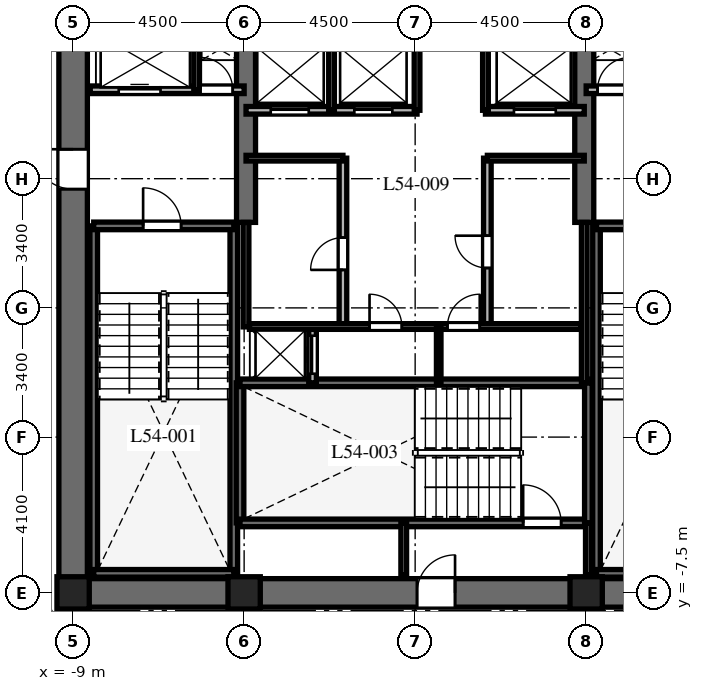
"""IFC4 building model, lengths in metres.
Left out: names, types, materials, properties, quantities, classifications, styles, units other than length and angle.
Written with IfcOpenShell. Run it as: python <this file> out.ifc"""

import sys

from ifc_helpers import new_model, si_unit, direction, frame, frame_2d, origin, origin_2d, place, context, subcontext, project, spatial, rectangle, extrude, element, fill, save


model = new_model("IFC4")
c1 = context("Model", 3, precision=1e-05, world=origin(), true_north=direction((0.0, 1.0)))
c2 = subcontext(c1, "Body", "Model", "MODEL_VIEW")
j1 = project(units=[si_unit("LENGTHUNIT", "METRE"), si_unit("PLANEANGLEUNIT", "RADIAN")], contexts=[c1])
p1 = place(None, origin())
s1 = spatial("IfcSite", under=j1, at=p1, CompositionType="ELEMENT")
p2 = place(p1, origin())
s2 = spatial("IfcBuilding", under=s1, at=p2, CompositionType="ELEMENT")
p3 = place(p2, frame((0.0, 0.0, 217.9)))
s3 = spatial("IfcBuildingStorey", under=s2, at=p3, CompositionType="ELEMENT", Elevation=217.9)
p4 = place(p3, frame((-9.375, -7.5, 0.0), z_axis=(0.0, 0.0, 1.0), x_axis=(1.0, 0.0, 0.0)))
e1 = element("IfcWall", 1, at=p4, inside=s3, PredefinedType="SHEAR", context=c2, shape_type="SweptSolid", body=[
    extrude(rectangle(XDim=18.75, YDim=0.75, at=frame_2d((9.375, 0.0))), origin(), (0.0, 0.0, 1.0), 3.8),
])
p5 = place(p4, frame((9.425, 0.0, 0.0)))
e2 = element("IfcOpeningElement", 2, at=p5, cuts=e1, PredefinedType="OPENING", context=c2, shape_type="SweptSolid", body=[
    extrude(rectangle(XDim=1.0, YDim=2.15, at=frame_2d((0.5, 1.075))), frame((0.0, 0.385, 0.0), z_axis=(0.0, -1.0, 0.0), x_axis=(1.0, 0.0, 0.0)), (0.0, 0.0, 1.0), 0.77),
])
p6 = place(p3, frame((-9.0, -7.125, 0.0), z_axis=(0.0, 0.0, 1.0), x_axis=(0.0, 1.0, 0.0)))
e3 = element("IfcWall", 3, at=p6, inside=s3, PredefinedType="SHEAR", context=c2, shape_type="SweptSolid", body=[
    extrude(rectangle(XDim=14.25, YDim=0.75, at=frame_2d((7.125, 0.0))), origin(), (0.0, 0.0, 1.0), 3.8),
])
p7 = place(p6, frame((10.25, 0.0, 0.0)))
e4 = element("IfcOpeningElement", 4, at=p7, cuts=e3, PredefinedType="OPENING", context=c2, shape_type="SweptSolid", body=[
    extrude(rectangle(XDim=1.05, YDim=2.15, at=frame_2d((0.525, 1.075))), frame((0.0, 0.385, 0.0), z_axis=(0.0, -1.0, 0.0), x_axis=(1.0, 0.0, 0.0)), (0.0, 0.0, 1.0), 0.77),
])
for number, where, z_axis, x_axis in (
    (5, (-4.45, 2.25, 0.0), (0.0, 0.0, 1.0), (0.0, 1.0, 0.0)),
    (6, (4.45, 2.25, 0.0), (0.0, 0.0, 1.0), (0.0, 1.0, 0.0)),
):
    element("IfcWall", number, at=place(p3, frame(where, z_axis=z_axis, x_axis=x_axis)), inside=s3, PredefinedType="SHEAR", context=c2, shape_type="SweptSolid", body=[
        extrude(rectangle(XDim=4.875, YDim=0.5, at=frame_2d((2.438, 0.0))), origin(), (0.0, 0.0, 1.0), 3.8),
    ])
for number, where, z_axis, x_axis in (
    (7, (-8.458, -6.985, 0.0), (0.0, 0.0, 1.0), (0.0, 1.0, 0.0)),
    (8, (-4.772, -6.985, 0.0), (0.0, 0.0, 1.0), (0.0, 1.0, 0.0)),
):
    element("IfcWall", number, at=place(p3, frame(where, z_axis=z_axis, x_axis=x_axis)), inside=s3, PredefinedType="SHEAR", context=c2, shape_type="SweptSolid", body=[
        extrude(rectangle(XDim=9.143, YDim=0.2, at=frame_2d((4.572, 0.0))), origin(), (0.0, 0.0, 1.0), 3.8),
    ])
p8 = place(p3, frame((-8.458, -6.985, 0.0), z_axis=(0.0, 0.0, 1.0), x_axis=(1.0, 0.0, 0.0)))
e9 = element("IfcWall", 9, at=p8, inside=s3, PredefinedType="SHEAR", context=c2, shape_type="SweptSolid", body=[
    extrude(rectangle(XDim=3.686, YDim=0.2, at=frame_2d((1.843, 0.0))), origin(), (0.0, 0.0, 1.0), 3.8),
])
p9 = place(p3, frame((-8.458, 2.158, 0.0), z_axis=(0.0, 0.0, 1.0), x_axis=(1.0, 0.0, 0.0)))
e10 = element("IfcWall", 10, at=p9, inside=s3, PredefinedType="SHEAR", context=c2, shape_type="SweptSolid", body=[
    extrude(rectangle(XDim=3.686, YDim=0.2, at=frame_2d((1.843, 0.0))), origin(), (0.0, 0.0, 1.0), 3.8),
])
p10 = place(p9, frame((1.3, 0.0, 0.0)))
e11 = element("IfcOpeningElement", 11, at=p10, cuts=e10, PredefinedType="OPENING", context=c2, shape_type="SweptSolid", body=[
    extrude(rectangle(XDim=1.0, YDim=2.15, at=frame_2d((0.5, 1.075))), frame((0.0, 0.11, 0.0), z_axis=(0.0, -1.0, 0.0), x_axis=(1.0, 0.0, 0.0)), (0.0, 0.0, 1.0), 0.22),
])
p11 = place(p3, frame((4.772, -6.985, 0.0), z_axis=(0.0, 0.0, 1.0), x_axis=(0.0, 1.0, 0.0)))
e12 = element("IfcWall", 12, at=p11, inside=s3, PredefinedType="SHEAR", context=c2, shape_type="SweptSolid", body=[
    extrude(rectangle(XDim=9.143, YDim=0.2, at=frame_2d((4.572, 0.0))), origin(), (0.0, 0.0, 1.0), 3.8),
])
p12 = place(p3, frame((4.772, -6.985, 0.0), z_axis=(0.0, 0.0, 1.0), x_axis=(1.0, 0.0, 0.0)))
e13 = element("IfcWall", 13, at=p12, inside=s3, PredefinedType="SHEAR", context=c2, shape_type="SweptSolid", body=[
    extrude(rectangle(XDim=3.686, YDim=0.2, at=frame_2d((1.843, 0.0))), origin(), (0.0, 0.0, 1.0), 3.8),
])
p13 = place(p3, frame((4.772, 2.158, 0.0), z_axis=(0.0, 0.0, 1.0), x_axis=(1.0, 0.0, 0.0)))
e14 = element("IfcWall", 14, at=p13, inside=s3, PredefinedType="SHEAR", context=c2, shape_type="SweptSolid", body=[
    extrude(rectangle(XDim=3.686, YDim=0.2, at=frame_2d((1.843, 0.0))), origin(), (0.0, 0.0, 1.0), 3.8),
])
p14 = place(p13, frame((1.35, 0.0, 0.0)))
e15 = element("IfcOpeningElement", 15, at=p14, cuts=e14, PredefinedType="OPENING", context=c2, shape_type="SweptSolid", body=[
    extrude(rectangle(XDim=1.0, YDim=2.15, at=frame_2d((0.5, 1.075))), frame((0.0, 0.11, 0.0), z_axis=(0.0, -1.0, 0.0), x_axis=(1.0, 0.0, 0.0)), (0.0, 0.0, 1.0), 0.22),
])
p15 = place(p3, frame((-4.608, -5.658, 0.0), z_axis=(0.0, 0.0, 1.0), x_axis=(0.0, 1.0, 0.0)))
e16 = element("IfcWall", 16, at=p15, inside=s3, PredefinedType="SHEAR", context=c2, shape_type="SweptSolid", body=[
    extrude(rectangle(XDim=3.686, YDim=0.2, at=frame_2d((1.843, 0.0))), origin(), (0.0, 0.0, 1.0), 3.8),
])
p16 = place(p3, frame((-4.608, -5.658, 0.0), z_axis=(0.0, 0.0, 1.0), x_axis=(1.0, 0.0, 0.0)))
e17 = element("IfcWall", 17, at=p16, inside=s3, PredefinedType="SHEAR", context=c2, shape_type="SweptSolid", body=[
    extrude(rectangle(XDim=9.166, YDim=0.2, at=frame_2d((4.583, 0.0))), origin(), (0.0, 0.0, 1.0), 3.8),
])
p17 = place(p16, frame((7.45, 0.0, 0.0)))
e18 = element("IfcOpeningElement", 18, at=p17, cuts=e17, PredefinedType="OPENING", context=c2, shape_type="SweptSolid", body=[
    extrude(rectangle(XDim=1.0, YDim=2.15, at=frame_2d((0.5, 1.075))), frame((0.0, 0.11, 0.0), z_axis=(0.0, -1.0, 0.0), x_axis=(1.0, 0.0, 0.0)), (0.0, 0.0, 1.0), 0.22),
])
p18 = place(p3, frame((-4.608, -1.972, 0.0), z_axis=(0.0, 0.0, 1.0), x_axis=(1.0, 0.0, 0.0)))
e19 = element("IfcWall", 19, at=p18, inside=s3, PredefinedType="SHEAR", context=c2, shape_type="SweptSolid", body=[
    extrude(rectangle(XDim=9.166, YDim=0.2, at=frame_2d((4.583, 0.0))), origin(), (0.0, 0.0, 1.0), 3.8),
])
p19 = place(p3, frame((4.558, -5.658, 0.0), z_axis=(0.0, 0.0, 1.0), x_axis=(0.0, 1.0, 0.0)))
e20 = element("IfcWall", 20, at=p19, inside=s3, PredefinedType="SHEAR", context=c2, shape_type="SweptSolid", body=[
    extrude(rectangle(XDim=3.686, YDim=0.2, at=frame_2d((1.843, 0.0))), origin(), (0.0, 0.0, 1.0), 3.8),
])
for number, where, z_axis, x_axis in (
    (21, (-9.0, -7.5, 0.0), (0.0, 0.0, 1.0), (1.0, 0.0, 0.0)),
    (22, (-4.5, -7.5, 0.0), (0.0, 0.0, 1.0), (1.0, 0.0, 0.0)),
    (23, (4.5, -7.5, 0.0), (0.0, 0.0, 1.0), (1.0, 0.0, 0.0)),
):
    element("IfcColumn", number, at=place(p3, frame(where, z_axis=z_axis, x_axis=x_axis)), inside=s3, PredefinedType="COLUMN", context=c2, shape_type="SweptSolid", body=[
        extrude(rectangle(XDim=0.85, YDim=0.85, at=origin_2d()), origin(), (0.0, 0.0, 1.0), 3.8),
    ])
for number, where, z_axis, x_axis in (
    (24, (-0.3, -7.02, 0.0), (0.0, 0.0, 1.0), (0.0, 1.0, 0.0)),
    (25, (4.558, -7.02, 0.0), (0.0, 0.0, 1.0), (0.0, 1.0, 0.0)),
):
    element("IfcWall", number, at=place(p3, frame(where, z_axis=z_axis, x_axis=x_axis)), inside=s3, PredefinedType="PARTITIONING", context=c2, shape_type="SweptSolid", body=[
        extrude(rectangle(XDim=1.362, YDim=0.15, at=frame_2d((0.681, 0.0))), origin(), (0.0, 0.0, 1.0), 3.5),
    ])
p20 = place(p3, frame((-8.55, 5.74, 0.0), z_axis=(0.0, 0.0, 1.0), x_axis=(1.0, 0.0, 0.0)))
e26 = element("IfcWall", 26, at=p20, inside=s3, PredefinedType="PARTITIONING", context=c2, shape_type="SweptSolid", body=[
    extrude(rectangle(XDim=4.05, YDim=0.2, at=frame_2d((2.025, 0.0))), origin(), (0.0, 0.0, 1.0), 3.5),
])
p21 = place(p20, frame((0.75, 0.0, 0.0)))
e27 = element("IfcOpeningElement", 27, at=p21, cuts=e26, PredefinedType="OPENING", context=c2, shape_type="SweptSolid", body=[
    extrude(rectangle(XDim=1.1, YDim=2.2, at=frame_2d((0.55, 1.1))), frame((0.0, 0.11, 0.0), z_axis=(0.0, -1.0, 0.0), x_axis=(1.0, 0.0, 0.0)), (0.0, 0.0, 1.0), 0.22),
])
p22 = place(p20, frame((2.9, 0.0, 0.0)))
e28 = element("IfcOpeningElement", 28, at=p22, cuts=e26, PredefinedType="OPENING", context=c2, shape_type="SweptSolid", body=[
    extrude(rectangle(XDim=0.85, YDim=2.03, at=frame_2d((0.425, 1.015))), frame((0.0, 0.11, 0.0), z_axis=(0.0, -1.0, 0.0), x_axis=(1.0, 0.0, 0.0)), (0.0, 0.0, 1.0), 0.22),
])
p23 = place(p3, frame((-5.75, 5.74, 0.0), z_axis=(0.0, 0.0, 1.0), x_axis=(0.0, 1.0, 0.0)))
e29 = element("IfcWall", 29, at=p23, inside=s3, PredefinedType="PARTITIONING", context=c2, shape_type="SweptSolid", body=[
    extrude(rectangle(XDim=1.41, YDim=0.15, at=frame_2d((0.705, 0.0))), origin(), (0.0, 0.0, 1.0), 3.5),
])
p24 = place(p3, frame((4.5, 5.74, 0.0), z_axis=(0.0, 0.0, 1.0), x_axis=(1.0, 0.0, 0.0)))
e30 = element("IfcWall", 30, at=p24, inside=s3, PredefinedType="PARTITIONING", context=c2, shape_type="SweptSolid", body=[
    extrude(rectangle(XDim=4.05, YDim=0.2, at=frame_2d((2.025, 0.0))), origin(), (0.0, 0.0, 1.0), 3.5),
])
p25 = place(p24, frame((0.3, 0.0, 0.0)))
e31 = element("IfcOpeningElement", 31, at=p25, cuts=e30, PredefinedType="OPENING", context=c2, shape_type="SweptSolid", body=[
    extrude(rectangle(XDim=0.85, YDim=2.03, at=frame_2d((0.425, 1.015))), frame((0.0, 0.11, 0.0), z_axis=(0.0, -1.0, 0.0), x_axis=(1.0, 0.0, 0.0)), (0.0, 0.0, 1.0), 0.22),
])
p26 = place(p24, frame((2.15, 0.0, 0.0)))
e32 = element("IfcOpeningElement", 32, at=p26, cuts=e30, PredefinedType="OPENING", context=c2, shape_type="SweptSolid", body=[
    extrude(rectangle(XDim=1.1, YDim=2.2, at=frame_2d((0.55, 1.1))), frame((0.0, 0.11, 0.0), z_axis=(0.0, -1.0, 0.0), x_axis=(1.0, 0.0, 0.0)), (0.0, 0.0, 1.0), 0.22),
])
p27 = place(p3, frame((-2.7, -1.972, 0.0), z_axis=(0.0, 0.0, 1.0), x_axis=(0.0, 1.0, 0.0)))
e33 = element("IfcWall", 33, at=p27, inside=s3, PredefinedType="PARTITIONING", context=c2, shape_type="SweptSolid", body=[
    extrude(rectangle(XDim=1.472, YDim=0.2, at=frame_2d((0.736, 0.0))), origin(), (0.0, 0.0, 1.0), 3.5),
])
p28 = place(p27, frame((0.24, 0.0, 0.0)))
e34 = element("IfcOpeningElement", 34, at=p28, cuts=e33, PredefinedType="OPENING", context=c2, shape_type="SweptSolid", body=[
    extrude(rectangle(XDim=1.0, YDim=2.2, at=frame_2d((0.5, 1.1))), frame((0.0, 0.11, 0.0), z_axis=(0.0, -1.0, 0.0), x_axis=(1.0, 0.0, 0.0)), (0.0, 0.0, 1.0), 0.22),
])
p29 = place(p3, frame((-4.45, 5.2, 0.0), z_axis=(0.0, 0.0, 1.0), x_axis=(1.0, 0.0, 0.0)))
e35 = element("IfcWall", 35, at=p29, inside=s3, PredefinedType="PARTITIONING", context=c2, shape_type="SweptSolid", body=[
    extrude(rectangle(XDim=4.5, YDim=0.2, at=frame_2d((2.25, 0.0))), origin(), (0.0, 0.0, 1.0), 3.5),
])
p30 = place(p29, frame((0.65, 0.0, 0.0)))
e36 = element("IfcOpeningElement", 36, at=p30, cuts=e35, PredefinedType="OPENING", context=c2, shape_type="SweptSolid", body=[
    extrude(rectangle(XDim=1.0, YDim=2.2, at=frame_2d((0.5, 1.1))), frame((0.0, 0.11, 0.0), z_axis=(0.0, -1.0, 0.0), x_axis=(1.0, 0.0, 0.0)), (0.0, 0.0, 1.0), 0.22),
])
p31 = place(p29, frame((2.85, 0.0, 0.0)))
e37 = element("IfcOpeningElement", 37, at=p31, cuts=e35, PredefinedType="OPENING", context=c2, shape_type="SweptSolid", body=[
    extrude(rectangle(XDim=1.0, YDim=2.2, at=frame_2d((0.5, 1.1))), frame((0.0, 0.11, 0.0), z_axis=(0.0, -1.0, 0.0), x_axis=(1.0, 0.0, 0.0)), (0.0, 0.0, 1.0), 0.22),
])
p32 = place(p3, frame((1.85, 5.2, 0.0), z_axis=(0.0, 0.0, 1.0), x_axis=(1.0, 0.0, 0.0)))
e38 = element("IfcWall", 38, at=p32, inside=s3, PredefinedType="PARTITIONING", context=c2, shape_type="SweptSolid", body=[
    extrude(rectangle(XDim=2.6, YDim=0.2, at=frame_2d((1.3, 0.0))), origin(), (0.0, 0.0, 1.0), 3.5),
])
p33 = place(p32, frame((0.75, 0.0, 0.0)))
e39 = element("IfcOpeningElement", 39, at=p33, cuts=e38, PredefinedType="OPENING", context=c2, shape_type="SweptSolid", body=[
    extrude(rectangle(XDim=1.1, YDim=2.2, at=frame_2d((0.55, 1.1))), frame((0.0, 0.11, 0.0), z_axis=(0.0, -1.0, 0.0), x_axis=(1.0, 0.0, 0.0)), (0.0, 0.0, 1.0), 0.22),
])
p34 = place(p3, frame((-2.2, 5.2, 0.0), z_axis=(0.0, 0.0, 1.0), x_axis=(0.0, 1.0, 0.0)))
e40 = element("IfcWall", 40, at=p34, inside=s3, PredefinedType="PARTITIONING", context=c2, shape_type="SweptSolid", body=[
    extrude(rectangle(XDim=1.85, YDim=0.15, at=frame_2d((0.925, 0.0))), origin(), (0.0, 0.0, 1.0), 3.5),
])
for number, where, z_axis, x_axis in (
    (41, (0.05, 5.2, 0.0), (0.0, 0.0, 1.0), (0.0, 1.0, 0.0)),
    (42, (1.85, 5.2, 0.0), (0.0, 0.0, 1.0), (0.0, 1.0, 0.0)),
):
    element("IfcWall", number, at=place(p3, frame(where, z_axis=z_axis, x_axis=x_axis)), inside=s3, PredefinedType="PARTITIONING", context=c2, shape_type="SweptSolid", body=[
        extrude(rectangle(XDim=1.95, YDim=0.15, at=frame_2d((0.975, 0.0))), origin(), (0.0, 0.0, 1.0), 3.5),
    ])
p35 = place(p3, frame((-4.45, -0.5, 0.0), z_axis=(0.0, 0.0, 1.0), x_axis=(0.0, 1.0, 0.0)))
e43 = element("IfcWall", 43, at=p35, inside=s3, PredefinedType="PARTITIONING", context=c2, shape_type="SweptSolid", body=[
    extrude(rectangle(XDim=2.75, YDim=0.15, at=frame_2d((1.375, 0.0))), origin(), (0.0, 0.0, 1.0), 3.5),
])
p36 = place(p3, frame((4.45, -1.972, 0.0), z_axis=(0.0, 0.0, 1.0), x_axis=(0.0, 1.0, 0.0)))
e44 = element("IfcWall", 44, at=p36, inside=s3, PredefinedType="PARTITIONING", context=c2, shape_type="SweptSolid", body=[
    extrude(rectangle(XDim=4.222, YDim=0.15, at=frame_2d((2.111, 0.0))), origin(), (0.0, 0.0, 1.0), 3.5),
])
p37 = place(p3, frame((-1.9, -0.5, 0.0), z_axis=(0.0, 0.0, 1.0), x_axis=(0.0, 1.0, 0.0)))
e45 = element("IfcWall", 45, at=p37, inside=s3, PredefinedType="PARTITIONING", context=c2, shape_type="SweptSolid", body=[
    extrude(rectangle(XDim=4.44, YDim=0.2, at=frame_2d((2.22, 0.0))), origin(), (0.0, 0.0, 1.0), 3.5),
])
p38 = place(p37, frame((1.5, 0.0, 0.0)))
e46 = element("IfcOpeningElement", 46, at=p38, cuts=e45, PredefinedType="OPENING", context=c2, shape_type="SweptSolid", body=[
    extrude(rectangle(XDim=0.85, YDim=2.03, at=frame_2d((0.425, 1.015))), frame((0.0, 0.11, 0.0), z_axis=(0.0, -1.0, 0.0), x_axis=(1.0, 0.0, 0.0)), (0.0, 0.0, 1.0), 0.22),
])
p39 = place(p3, frame((-4.45, 3.94, 0.0), z_axis=(0.0, 0.0, 1.0), x_axis=(1.0, 0.0, 0.0)))
e47 = element("IfcWall", 47, at=p39, inside=s3, PredefinedType="PARTITIONING", context=c2, shape_type="SweptSolid", body=[
    extrude(rectangle(XDim=2.55, YDim=0.15, at=frame_2d((1.275, 0.0))), origin(), (0.0, 0.0, 1.0), 3.5),
])
p40 = place(p3, frame((1.9, -0.5, 0.0), z_axis=(0.0, 0.0, 1.0), x_axis=(0.0, 1.0, 0.0)))
e48 = element("IfcWall", 48, at=p40, inside=s3, PredefinedType="PARTITIONING", context=c2, shape_type="SweptSolid", body=[
    extrude(rectangle(XDim=4.44, YDim=0.2, at=frame_2d((2.22, 0.0))), origin(), (0.0, 0.0, 1.0), 3.5),
])
p41 = place(p40, frame((1.55, 0.0, 0.0)))
e49 = element("IfcOpeningElement", 49, at=p41, cuts=e48, PredefinedType="OPENING", context=c2, shape_type="SweptSolid", body=[
    extrude(rectangle(XDim=0.85, YDim=2.03, at=frame_2d((0.425, 1.015))), frame((0.0, 0.11, 0.0), z_axis=(0.0, -1.0, 0.0), x_axis=(1.0, 0.0, 0.0)), (0.0, 0.0, 1.0), 0.22),
])
p42 = place(p3, frame((1.9, 3.94, 0.0), z_axis=(0.0, 0.0, 1.0), x_axis=(1.0, 0.0, 0.0)))
e50 = element("IfcWall", 50, at=p42, inside=s3, PredefinedType="PARTITIONING", context=c2, shape_type="SweptSolid", body=[
    extrude(rectangle(XDim=2.55, YDim=0.15, at=frame_2d((1.275, 0.0))), origin(), (0.0, 0.0, 1.0), 3.5),
])
p43 = place(p3, frame((-4.36, -0.49, 0.0), z_axis=(0.0, 0.0, 1.0), x_axis=(1.0, 0.0, 0.0)))
e51 = element("IfcWall", 51, at=p43, inside=s3, PredefinedType="PARTITIONING", context=c2, shape_type="SweptSolid", body=[
    extrude(rectangle(XDim=8.72, YDim=0.15, at=frame_2d((4.36, 0.0))), origin(), (0.0, 0.0, 1.0), 3.5),
])
p44 = place(p43, frame((3.16, 0.0, 0.0)))
e52 = element("IfcOpeningElement", 52, at=p44, cuts=e51, PredefinedType="OPENING", context=c2, shape_type="SweptSolid", body=[
    extrude(rectangle(XDim=0.85, YDim=2.03, at=frame_2d((0.425, 1.015))), frame((0.0, 0.085, 0.0), z_axis=(0.0, -1.0, 0.0), x_axis=(1.0, 0.0, 0.0)), (0.0, 0.0, 1.0), 0.17),
])
p45 = place(p43, frame((5.21, 0.0, 0.0)))
e53 = element("IfcOpeningElement", 53, at=p45, cuts=e51, PredefinedType="OPENING", context=c2, shape_type="SweptSolid", body=[
    extrude(rectangle(XDim=0.85, YDim=2.03, at=frame_2d((0.425, 1.015))), frame((0.0, 0.085, 0.0), z_axis=(0.0, -1.0, 0.0), x_axis=(1.0, 0.0, 0.0)), (0.0, 0.0, 1.0), 0.17),
])
p46 = place(p3, frame((0.62, -1.972, 0.0), z_axis=(0.0, 0.0, 1.0), x_axis=(0.0, 1.0, 0.0)))
e54 = element("IfcWall", 54, at=p46, inside=s3, PredefinedType="PARTITIONING", context=c2, shape_type="SweptSolid", body=[
    extrude(rectangle(XDim=1.472, YDim=0.12, at=frame_2d((0.736, 0.0))), origin(), (0.0, 0.0, 1.0), 3.5),
])
p47 = place(p10, origin())
e55 = element("IfcDoor", 55, at=p47, inside=s3, OperationType="SINGLE_SWING_LEFT", PredefinedType="DOOR", context=c2, shape_type="SweptSolid", body=[
    extrude(rectangle(XDim=1.0, YDim=2.15, at=frame_2d((0.5, 1.075))), frame((0.0, 0.025, 0.0), z_axis=(0.0, -1.0, 0.0), x_axis=(1.0, 0.0, 0.0)), (0.0, 0.0, 1.0), 0.05),
])
fill(e11, e55)
p48 = place(p17, origin())
e56 = element("IfcDoor", 56, at=p48, inside=s3, OperationType="SINGLE_SWING_LEFT", PredefinedType="DOOR", context=c2, shape_type="SweptSolid", body=[
    extrude(rectangle(XDim=1.0, YDim=2.15, at=frame_2d((0.5, 1.075))), frame((0.0, 0.025, 0.0), z_axis=(0.0, -1.0, 0.0), x_axis=(1.0, 0.0, 0.0)), (0.0, 0.0, 1.0), 0.05),
])
fill(e18, e56)
p49 = place(p5, origin())
e57 = element("IfcDoor", 57, at=p49, inside=s3, OperationType="SINGLE_SWING_RIGHT", PredefinedType="DOOR", context=c2, shape_type="SweptSolid", body=[
    extrude(rectangle(XDim=1.0, YDim=2.15, at=frame_2d((0.5, 1.075))), frame((0.0, 0.025, 0.0), z_axis=(0.0, -1.0, 0.0), x_axis=(1.0, 0.0, 0.0)), (0.0, 0.0, 1.0), 0.05),
])
fill(e2, e57)
p50 = place(p7, origin())
e58 = element("IfcDoor", 58, at=p50, inside=s3, OperationType="SINGLE_SWING_RIGHT", PredefinedType="DOOR", context=c2, shape_type="SweptSolid", body=[
    extrude(rectangle(XDim=1.05, YDim=2.15, at=frame_2d((0.525, 1.075))), frame((0.0, 0.025, 0.0), z_axis=(0.0, -1.0, 0.0), x_axis=(1.0, 0.0, 0.0)), (0.0, 0.0, 1.0), 0.05),
])
fill(e4, e58)
p51 = place(p21, origin())
e59 = element("IfcDoor", 59, at=p51, inside=s3, OperationType="SLIDING_TO_LEFT", PredefinedType="DOOR", context=c2, shape_type="SweptSolid", body=[
    extrude(rectangle(XDim=1.1, YDim=2.2, at=frame_2d((0.55, 1.1))), frame((0.0, 0.025, 0.0), z_axis=(0.0, -1.0, 0.0), x_axis=(1.0, 0.0, 0.0)), (0.0, 0.0, 1.0), 0.05),
])
fill(e27, e59)
p52 = place(p22, origin())
e60 = element("IfcDoor", 60, at=p52, inside=s3, OperationType="SINGLE_SWING_LEFT", PredefinedType="DOOR", context=c2, shape_type="SweptSolid", body=[
    extrude(rectangle(XDim=0.85, YDim=2.03, at=frame_2d((0.425, 1.015))), frame((0.0, 0.025, 0.0), z_axis=(0.0, -1.0, 0.0), x_axis=(1.0, 0.0, 0.0)), (0.0, 0.0, 1.0), 0.05),
])
fill(e28, e60)
p53 = place(p25, origin())
e61 = element("IfcDoor", 61, at=p53, inside=s3, OperationType="SINGLE_SWING_RIGHT", PredefinedType="DOOR", context=c2, shape_type="SweptSolid", body=[
    extrude(rectangle(XDim=0.85, YDim=2.03, at=frame_2d((0.425, 1.015))), frame((0.0, 0.025, 0.0), z_axis=(0.0, -1.0, 0.0), x_axis=(1.0, 0.0, 0.0)), (0.0, 0.0, 1.0), 0.05),
])
fill(e31, e61)
p54 = place(p28, origin())
e62 = element("IfcDoor", 62, at=p54, inside=s3, OperationType="SLIDING_TO_LEFT", PredefinedType="DOOR", context=c2, shape_type="SweptSolid", body=[
    extrude(rectangle(XDim=1.0, YDim=2.2, at=frame_2d((0.5, 1.1))), frame((0.0, 0.025, 0.0), z_axis=(0.0, -1.0, 0.0), x_axis=(1.0, 0.0, 0.0)), (0.0, 0.0, 1.0), 0.05),
])
fill(e34, e62)
p55 = place(p30, origin())
e63 = element("IfcDoor", 63, at=p55, inside=s3, OperationType="SLIDING_TO_LEFT", PredefinedType="DOOR", context=c2, shape_type="SweptSolid", body=[
    extrude(rectangle(XDim=1.0, YDim=2.2, at=frame_2d((0.5, 1.1))), frame((0.0, 0.025, 0.0), z_axis=(0.0, -1.0, 0.0), x_axis=(1.0, 0.0, 0.0)), (0.0, 0.0, 1.0), 0.05),
])
fill(e36, e63)
p56 = place(p31, origin())
e64 = element("IfcDoor", 64, at=p56, inside=s3, OperationType="SLIDING_TO_RIGHT", PredefinedType="DOOR", context=c2, shape_type="SweptSolid", body=[
    extrude(rectangle(XDim=1.0, YDim=2.2, at=frame_2d((0.5, 1.1))), frame((0.0, 0.025, 0.0), z_axis=(0.0, -1.0, 0.0), x_axis=(1.0, 0.0, 0.0)), (0.0, 0.0, 1.0), 0.05),
])
fill(e37, e64)
p57 = place(p33, origin())
e65 = element("IfcDoor", 65, at=p57, inside=s3, OperationType="SLIDING_TO_RIGHT", PredefinedType="DOOR", context=c2, shape_type="SweptSolid", body=[
    extrude(rectangle(XDim=1.1, YDim=2.2, at=frame_2d((0.55, 1.1))), frame((0.0, 0.025, 0.0), z_axis=(0.0, -1.0, 0.0), x_axis=(1.0, 0.0, 0.0)), (0.0, 0.0, 1.0), 0.05),
])
fill(e39, e65)
p58 = place(p38, origin())
e66 = element("IfcDoor", 66, at=p58, inside=s3, OperationType="SINGLE_SWING_LEFT", PredefinedType="DOOR", context=c2, shape_type="SweptSolid", body=[
    extrude(rectangle(XDim=0.85, YDim=2.03, at=frame_2d((0.425, 1.015))), frame((0.0, 0.025, 0.0), z_axis=(0.0, -1.0, 0.0), x_axis=(1.0, 0.0, 0.0)), (0.0, 0.0, 1.0), 0.05),
])
fill(e46, e66)
p59 = place(p41, origin())
e67 = element("IfcDoor", 67, at=p59, inside=s3, OperationType="SINGLE_SWING_RIGHT", PredefinedType="DOOR", context=c2, shape_type="SweptSolid", body=[
    extrude(rectangle(XDim=0.85, YDim=2.03, at=frame_2d((0.425, 1.015))), frame((0.0, 0.025, 0.0), z_axis=(0.0, -1.0, 0.0), x_axis=(1.0, 0.0, 0.0)), (0.0, 0.0, 1.0), 0.05),
])
fill(e49, e67)
p60 = place(p44, origin())
e68 = element("IfcDoor", 68, at=p60, inside=s3, OperationType="SINGLE_SWING_LEFT", PredefinedType="DOOR", context=c2, shape_type="SweptSolid", body=[
    extrude(rectangle(XDim=0.85, YDim=2.03, at=frame_2d((0.425, 1.015))), frame((0.0, 0.025, 0.0), z_axis=(0.0, -1.0, 0.0), x_axis=(1.0, 0.0, 0.0)), (0.0, 0.0, 1.0), 0.05),
])
fill(e52, e68)
p61 = place(p45, origin())
e69 = element("IfcDoor", 69, at=p61, inside=s3, OperationType="SINGLE_SWING_RIGHT", PredefinedType="DOOR", context=c2, shape_type="SweptSolid", body=[
    extrude(rectangle(XDim=0.85, YDim=2.03, at=frame_2d((0.425, 1.015))), frame((0.0, 0.025, 0.0), z_axis=(0.0, -1.0, 0.0), x_axis=(1.0, 0.0, 0.0)), (0.0, 0.0, 1.0), 0.05),
])
fill(e53, e69)
save(model, sys.argv[1])
